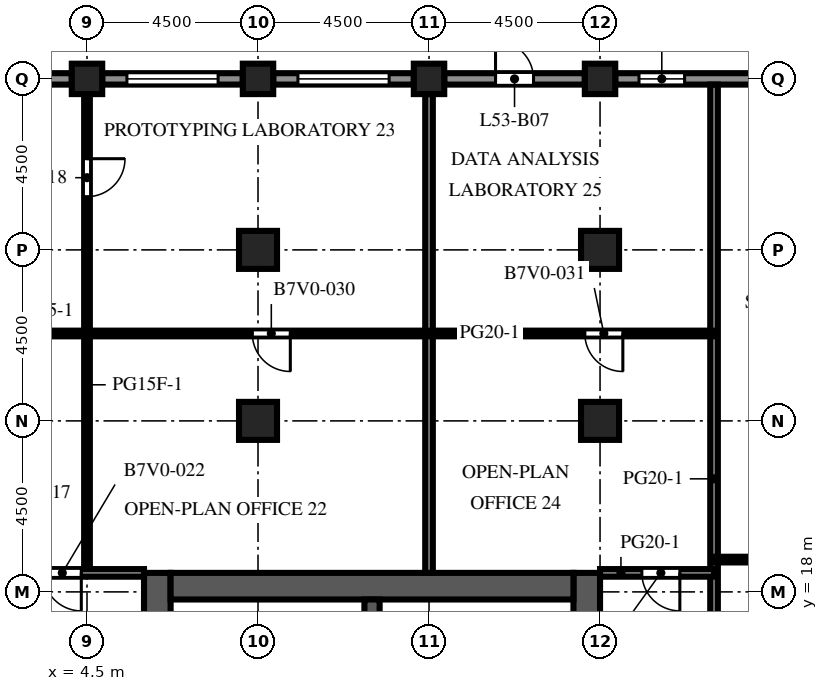
"""IFC4 building model, lengths in metres.
Left out: names, types, materials, properties, quantities, classifications, styles, units other than length and angle.
Written with IfcOpenShell. Run it as: python <this file> out.ifc"""

import sys

from ifc_helpers import new_model, si_unit, direction, frame, frame_2d, origin, origin_2d, place, context, subcontext, project, spatial, rectangle, extrude, element, fill, save


model = new_model("IFC4")
c1 = context("Model", 3, precision=1e-05, world=origin(), true_north=direction((0.0, 1.0)))
c2 = subcontext(c1, "Body", "Model", "MODEL_VIEW")
j1 = project(units=[si_unit("LENGTHUNIT", "METRE"), si_unit("PLANEANGLEUNIT", "RADIAN")], contexts=[c1])
p1 = place(None, origin())
s1 = spatial("IfcSite", under=j1, at=p1, CompositionType="ELEMENT")
p2 = place(p1, origin())
s2 = spatial("IfcBuilding", under=s1, at=p2, CompositionType="ELEMENT")
p3 = place(p2, frame((0.0, 0.0, 235.7)))
s3 = spatial("IfcBuildingStorey", under=s2, at=p3, CompositionType="ELEMENT", Elevation=235.7)
for number, where, z_axis, x_axis in (
    (1, (4.5, 31.5, 0.0), (0.0, 0.0, 1.0), (1.0, 0.0, 0.0)),
    (2, (9.0, 31.5, 0.0), (0.0, 0.0, 1.0), (1.0, 0.0, 0.0)),
    (3, (13.5, 31.5, 0.0), (0.0, 0.0, 1.0), (1.0, 0.0, 0.0)),
    (4, (18.0, 31.5, 0.0), (0.0, 0.0, 1.0), (1.0, 0.0, 0.0)),
):
    element("IfcColumn", number, at=place(p3, frame(where, z_axis=z_axis, x_axis=x_axis)), inside=s3, PredefinedType="COLUMN", context=c2, shape_type="SweptSolid", body=[
        extrude(rectangle(XDim=0.8, YDim=0.8, at=origin_2d()), origin(), (0.0, 0.0, 1.0), 4.1),
    ])
for number, where, z_axis, x_axis in (
    (5, (9.0, 22.5, 0.0), (0.0, 0.0, 1.0), (1.0, 0.0, 0.0)),
    (6, (9.0, 27.0, 0.0), (0.0, 0.0, 1.0), (1.0, 0.0, 0.0)),
    (7, (18.0, 22.5, 0.0), (0.0, 0.0, 1.0), (1.0, 0.0, 0.0)),
    (8, (18.0, 27.0, 0.0), (0.0, 0.0, 1.0), (1.0, 0.0, 0.0)),
):
    element("IfcColumn", number, at=place(p3, frame(where, z_axis=z_axis, x_axis=x_axis)), inside=s3, PredefinedType="COLUMN", context=c2, shape_type="SweptSolid", body=[
        extrude(rectangle(XDim=1.0, YDim=1.0, at=origin_2d()), origin(), (0.0, 0.0, 1.0), 4.1),
    ])
p4 = place(p3, frame((6.35, -9.0, 0.0), z_axis=(0.0, 0.0, 1.0), x_axis=(0.0, 1.0, 0.0)))
e9 = element("IfcWall", 9, at=p4, inside=s3, PredefinedType="SHEAR", context=c2, shape_type="SweptSolid", body=[
    extrude(rectangle(XDim=27.5, YDim=0.7, at=frame_2d((13.75, 0.0))), origin(), (0.0, 0.0, 1.0), 4.1),
])
p5 = place(p4, frame((12.55, 0.0, 0.0)))
e10 = element("IfcOpeningElement", 10, at=p5, cuts=e9, PredefinedType="OPENING", context=c2, shape_type="SweptSolid", body=[
    extrude(rectangle(XDim=2.4, YDim=2.4, at=frame_2d((1.2, 1.2))), frame((0.0, 0.36, 0.0), z_axis=(0.0, -1.0, 0.0), x_axis=(1.0, 0.0, 0.0)), (0.0, 0.0, 1.0), 0.72),
])
p6 = place(p4, frame((5.42, 0.0, 0.0)))
e11 = element("IfcOpeningElement", 11, at=p6, cuts=e9, PredefinedType="OPENING", context=c2, shape_type="SweptSolid", body=[
    extrude(rectangle(XDim=1.2, YDim=2.1, at=frame_2d((0.6, 1.05))), frame((0.0, 0.36, 0.0), z_axis=(0.0, -1.0, 0.0), x_axis=(1.0, 0.0, 0.0)), (0.0, 0.0, 1.0), 0.72),
])
p7 = place(p4, frame((19.46, 0.0, 0.0)))
e12 = element("IfcOpeningElement", 12, at=p7, cuts=e9, PredefinedType="OPENING", context=c2, shape_type="SweptSolid", body=[
    extrude(rectangle(XDim=1.0, YDim=2.1, at=frame_2d((0.5, 1.05))), frame((0.0, 0.36, 0.0), z_axis=(0.0, -1.0, 0.0), x_axis=(1.0, 0.0, 0.0)), (0.0, 0.0, 1.0), 0.72),
])
p8 = place(p4, frame((21.17, 0.0, 0.0)))
e13 = element("IfcOpeningElement", 13, at=p8, cuts=e9, PredefinedType="OPENING", context=c2, shape_type="SweptSolid", body=[
    extrude(rectangle(XDim=1.0, YDim=2.1, at=frame_2d((0.5, 1.05))), frame((0.0, 0.36, 0.0), z_axis=(0.0, -1.0, 0.0), x_axis=(1.0, 0.0, 0.0)), (0.0, 0.0, 1.0), 0.72),
])
p9 = place(p4, frame((23.26, 0.0, 0.0)))
e14 = element("IfcOpeningElement", 14, at=p9, cuts=e9, PredefinedType="OPENING", context=c2, shape_type="SweptSolid", body=[
    extrude(rectangle(XDim=1.0, YDim=2.1, at=frame_2d((0.5, 1.05))), frame((0.0, 0.36, 0.0), z_axis=(0.0, -1.0, 0.0), x_axis=(1.0, 0.0, 0.0)), (0.0, 0.0, 1.0), 0.72),
])
p10 = place(p4, frame((25.35, 0.0, 0.0)))
e15 = element("IfcOpeningElement", 15, at=p10, cuts=e9, PredefinedType="OPENING", context=c2, shape_type="SweptSolid", body=[
    extrude(rectangle(XDim=1.0, YDim=2.1, at=frame_2d((0.5, 1.05))), frame((0.0, 0.36, 0.0), z_axis=(0.0, -1.0, 0.0), x_axis=(1.0, 0.0, 0.0)), (0.0, 0.0, 1.0), 0.72),
])
p11 = place(p3, frame((17.65, -9.0, 0.0), z_axis=(0.0, 0.0, 1.0), x_axis=(0.0, 1.0, 0.0)))
e16 = element("IfcWall", 16, at=p11, inside=s3, PredefinedType="SHEAR", context=c2, shape_type="SweptSolid", body=[
    extrude(rectangle(XDim=27.5, YDim=0.7, at=frame_2d((13.75, 0.0))), origin(), (0.0, 0.0, 1.0), 4.1),
])
p12 = place(p11, frame((12.55, 0.0, 0.0)))
e17 = element("IfcOpeningElement", 17, at=p12, cuts=e16, PredefinedType="OPENING", context=c2, shape_type="SweptSolid", body=[
    extrude(rectangle(XDim=2.4, YDim=2.4, at=frame_2d((1.2, 1.2))), frame((0.0, 0.36, 0.0), z_axis=(0.0, -1.0, 0.0), x_axis=(1.0, 0.0, 0.0)), (0.0, 0.0, 1.0), 0.72),
])
p13 = place(p11, frame((6.825, 0.0, 0.0)))
e18 = element("IfcOpeningElement", 18, at=p13, cuts=e16, PredefinedType="OPENING", context=c2, shape_type="SweptSolid", body=[
    extrude(rectangle(XDim=1.2, YDim=2.1, at=frame_2d((0.6, 1.05))), frame((0.0, 0.36, 0.0), z_axis=(0.0, -1.0, 0.0), x_axis=(1.0, 0.0, 0.0)), (0.0, 0.0, 1.0), 0.72),
])
p14 = place(p11, frame((19.475, 0.0, 0.0)))
e19 = element("IfcOpeningElement", 19, at=p14, cuts=e16, PredefinedType="OPENING", context=c2, shape_type="SweptSolid", body=[
    extrude(rectangle(XDim=1.2, YDim=2.1, at=frame_2d((0.6, 1.05))), frame((0.0, 0.36, 0.0), z_axis=(0.0, -1.0, 0.0), x_axis=(1.0, 0.0, 0.0)), (0.0, 0.0, 1.0), 0.72),
])
p15 = place(p3, frame((6.7, 18.15, 0.0), z_axis=(0.0, 0.0, 1.0), x_axis=(1.0, 0.0, 0.0)))
e20 = element("IfcWall", 20, at=p15, inside=s3, PredefinedType="SHEAR", context=c2, shape_type="SweptSolid", body=[
    extrude(rectangle(XDim=10.6, YDim=0.7, at=frame_2d((5.3, 0.0))), origin(), (0.0, 0.0, 1.0), 4.1),
])
p16 = place(p3, frame((12.0, 10.2, 0.0), z_axis=(0.0, 0.0, 1.0), x_axis=(0.0, 1.0, 0.0)))
e21 = element("IfcWall", 21, at=p16, inside=s3, PredefinedType="SHEAR", context=c2, shape_type="SweptSolid", body=[
    extrude(rectangle(XDim=7.6, YDim=0.4, at=frame_2d((3.8, 0.0))), origin(), (0.0, 0.0, 1.0), 4.1),
])
p17 = place(p3, frame((18.4, 31.5, 0.0), z_axis=(0.0, 0.0, 1.0), x_axis=(1.0, 0.0, 0.0)))
e22 = element("IfcWall", 22, at=p17, inside=s3, PredefinedType="SOLIDWALL", context=c2, shape_type="SweptSolid", body=[
    extrude(rectangle(XDim=3.7, YDim=0.3, at=frame_2d((1.85, 0.0))), origin(), (0.0, 0.0, 1.0), 2.85),
])
p18 = place(p17, frame((0.625, 0.0, 0.8)))
e23 = element("IfcOpeningElement", 23, at=p18, cuts=e22, PredefinedType="OPENING", context=c2, shape_type="SweptSolid", body=[
    extrude(rectangle(XDim=1.2, YDim=1.7, at=frame_2d((0.6, 0.85))), frame((0.0, 0.16, 0.0), z_axis=(0.0, -1.0, 0.0), x_axis=(1.0, 0.0, 0.0)), (0.0, 0.0, 1.0), 0.32),
])
p19 = place(p3, frame((13.9, 31.5, 0.0), z_axis=(0.0, 0.0, 1.0), x_axis=(1.0, 0.0, 0.0)))
e24 = element("IfcWall", 24, at=p19, inside=s3, PredefinedType="SOLIDWALL", context=c2, shape_type="SweptSolid", body=[
    extrude(rectangle(XDim=3.7, YDim=0.3, at=frame_2d((1.85, 0.0))), origin(), (0.0, 0.0, 1.0), 2.85),
])
p20 = place(p19, frame((1.35, 0.0, 0.0)))
e25 = element("IfcOpeningElement", 25, at=p20, cuts=e24, PredefinedType="OPENING", context=c2, shape_type="SweptSolid", body=[
    extrude(rectangle(XDim=1.0, YDim=2.2, at=frame_2d((0.5, 1.1))), frame((0.0, 0.16, 0.0), z_axis=(0.0, -1.0, 0.0), x_axis=(1.0, 0.0, 0.0)), (0.0, 0.0, 1.0), 0.32),
])
p21 = place(p3, frame((9.4, 31.5, 0.0), z_axis=(0.0, 0.0, 1.0), x_axis=(1.0, 0.0, 0.0)))
e26 = element("IfcWall", 26, at=p21, inside=s3, PredefinedType="SOLIDWALL", context=c2, shape_type="SweptSolid", body=[
    extrude(rectangle(XDim=3.7, YDim=0.3, at=frame_2d((1.85, 0.0))), origin(), (0.0, 0.0, 1.0), 2.85),
])
p22 = place(p21, frame((0.65, 0.0, 0.8)))
e27 = element("IfcOpeningElement", 27, at=p22, cuts=e26, PredefinedType="OPENING", context=c2, shape_type="SweptSolid", body=[
    extrude(rectangle(XDim=2.4, YDim=1.7, at=frame_2d((1.2, 0.85))), frame((0.0, 0.16, 0.0), z_axis=(0.0, -1.0, 0.0), x_axis=(1.0, 0.0, 0.0)), (0.0, 0.0, 1.0), 0.32),
])
p23 = place(p3, frame((4.9, 31.5, 0.0), z_axis=(0.0, 0.0, 1.0), x_axis=(1.0, 0.0, 0.0)))
e28 = element("IfcWall", 28, at=p23, inside=s3, PredefinedType="SOLIDWALL", context=c2, shape_type="SweptSolid", body=[
    extrude(rectangle(XDim=3.7, YDim=0.3, at=frame_2d((1.85, 0.0))), origin(), (0.0, 0.0, 1.0), 2.85),
])
p24 = place(p23, frame((0.65, 0.0, 0.8)))
e29 = element("IfcOpeningElement", 29, at=p24, cuts=e28, PredefinedType="OPENING", context=c2, shape_type="SweptSolid", body=[
    extrude(rectangle(XDim=2.4, YDim=1.7, at=frame_2d((1.2, 0.85))), frame((0.0, 0.16, 0.0), z_axis=(0.0, -1.0, 0.0), x_axis=(1.0, 0.0, 0.0)), (0.0, 0.0, 1.0), 0.32),
])
p25 = place(p3, frame((0.4, 31.5, 0.0), z_axis=(0.0, 0.0, 1.0), x_axis=(1.0, 0.0, 0.0)))
e30 = element("IfcWall", 30, at=p25, inside=s3, PredefinedType="SOLIDWALL", context=c2, shape_type="SweptSolid", body=[
    extrude(rectangle(XDim=3.7, YDim=0.3, at=frame_2d((1.85, 0.0))), origin(), (0.0, 0.0, 1.0), 2.85),
])
p26 = place(p25, frame((0.65, 0.0, 0.8)))
e31 = element("IfcOpeningElement", 31, at=p26, cuts=e30, PredefinedType="OPENING", context=c2, shape_type="SweptSolid", body=[
    extrude(rectangle(XDim=2.4, YDim=1.7, at=frame_2d((1.2, 0.85))), frame((0.0, 0.16, 0.0), z_axis=(0.0, -1.0, 0.0), x_axis=(1.0, 0.0, 0.0)), (0.0, 0.0, 1.0), 0.32),
])
p27 = place(p3, frame((4.5, 31.1, 0.0), z_axis=(0.0, 0.0, 1.0), x_axis=(0.0, -1.0, 0.0)))
e32 = element("IfcWall", 32, at=p27, inside=s3, PredefinedType="PARTITIONING", context=c2, shape_type="SweptSolid", body=[
    extrude(rectangle(XDim=12.6, YDim=0.15, at=frame_2d((6.3, 0.0))), origin(), (0.0, 0.0, 1.0), 3.65),
])
p28 = place(p27, frame((1.7, 0.0, 0.0)))
e33 = element("IfcOpeningElement", 33, at=p28, cuts=e32, PredefinedType="OPENING", context=c2, shape_type="SweptSolid", body=[
    extrude(rectangle(XDim=1.0, YDim=2.1, at=frame_2d((0.5, 1.05))), frame((0.0, 0.085, 0.0), z_axis=(0.0, -1.0, 0.0), x_axis=(1.0, 0.0, 0.0)), (0.0, 0.0, 1.0), 0.17),
])
p29 = place(p3, frame((13.5, 18.5, 0.0), z_axis=(0.0, 0.0, 1.0), x_axis=(0.0, 1.0, 0.0)))
e34 = element("IfcWall", 34, at=p29, inside=s3, PredefinedType="PARTITIONING", context=c2, shape_type="SweptSolid", body=[
    extrude(rectangle(XDim=12.6, YDim=0.2, at=frame_2d((6.3, 0.0))), origin(), (0.0, 0.0, 1.0), 3.65),
])
p30 = place(p3, frame((21.0, 31.35, 0.0), z_axis=(0.0, 0.0, 1.0), x_axis=(0.0, -1.0, 0.0)))
e35 = element("IfcWall", 35, at=p30, inside=s3, PredefinedType="PARTITIONING", context=c2, shape_type="SweptSolid", body=[
    extrude(rectangle(XDim=25.1, YDim=0.2, at=frame_2d((12.55, 0.0))), origin(), (0.0, 0.0, 1.0), 3.65),
])
p31 = place(p30, frame((20.75, 0.0, 0.0)))
e36 = element("IfcOpeningElement", 36, at=p31, cuts=e35, PredefinedType="OPENING", context=c2, shape_type="SweptSolid", body=[
    extrude(rectangle(XDim=1.0, YDim=2.1, at=frame_2d((0.5, 1.05))), frame((0.0, 0.11, 0.0), z_axis=(0.0, -1.0, 0.0), x_axis=(1.0, 0.0, 0.0)), (0.0, 0.0, 1.0), 0.22),
])
p32 = place(p3, frame((1.5, 18.5, 0.0), z_axis=(0.0, 0.0, 1.0), x_axis=(1.0, 0.0, 0.0)))
e37 = element("IfcWall", 37, at=p32, inside=s3, PredefinedType="PARTITIONING", context=c2, shape_type="SweptSolid", body=[
    extrude(rectangle(XDim=4.5, YDim=0.2, at=frame_2d((2.25, 0.0))), origin(), (0.0, 0.0, 1.0), 3.65),
])
p33 = place(p32, frame((1.85, 0.0, 0.0)))
e38 = element("IfcOpeningElement", 38, at=p33, cuts=e37, PredefinedType="OPENING", context=c2, shape_type="SweptSolid", body=[
    extrude(rectangle(XDim=1.0, YDim=2.1, at=frame_2d((0.5, 1.05))), frame((0.0, 0.11, 0.0), z_axis=(0.0, -1.0, 0.0), x_axis=(1.0, 0.0, 0.0)), (0.0, 0.0, 1.0), 0.22),
])
p34 = place(p3, frame((18.0, 18.5, 0.0), z_axis=(0.0, 0.0, 1.0), x_axis=(1.0, 0.0, 0.0)))
e39 = element("IfcWall", 39, at=p34, inside=s3, PredefinedType="PARTITIONING", context=c2, shape_type="SweptSolid", body=[
    extrude(rectangle(XDim=3.0, YDim=0.2, at=frame_2d((1.5, 0.0))), origin(), (0.0, 0.0, 1.0), 3.65),
])
p35 = place(p34, frame((1.1, 0.0, 0.0)))
e40 = element("IfcOpeningElement", 40, at=p35, cuts=e39, PredefinedType="OPENING", context=c2, shape_type="SweptSolid", body=[
    extrude(rectangle(XDim=1.0, YDim=2.1, at=frame_2d((0.5, 1.05))), frame((0.0, 0.11, 0.0), z_axis=(0.0, -1.0, 0.0), x_axis=(1.0, 0.0, 0.0)), (0.0, 0.0, 1.0), 0.22),
])
p36 = place(p3, frame((21.0, 18.85, 0.0), z_axis=(0.0, 0.0, 1.0), x_axis=(1.0, 0.0, 0.0)))
e41 = element("IfcWall", 41, at=p36, inside=s3, PredefinedType="PARTITIONING", context=c2, shape_type="SweptSolid", body=[
    extrude(rectangle(XDim=5.85, YDim=0.15, at=frame_2d((2.925, 0.0))), origin(), (0.0, 0.0, 1.0), 3.65),
])
p37 = place(p36, frame((3.35, 0.0, 0.0)))
e42 = element("IfcOpeningElement", 42, at=p37, cuts=e41, PredefinedType="OPENING", context=c2, shape_type="SweptSolid", body=[
    extrude(rectangle(XDim=1.0, YDim=2.1, at=frame_2d((0.5, 1.05))), frame((0.0, 0.085, 0.0), z_axis=(0.0, -1.0, 0.0), x_axis=(1.0, 0.0, 0.0)), (0.0, 0.0, 1.0), 0.17),
])
p38 = place(p3, frame((-13.5, 24.8, 0.0), z_axis=(0.0, 0.0, 1.0), x_axis=(1.0, 0.0, 0.0)))
e43 = element("IfcWall", 43, at=p38, inside=s3, PredefinedType="PARTITIONING", context=c2, shape_type="SweptSolid", body=[
    extrude(rectangle(XDim=34.5, YDim=0.15, at=frame_2d((17.25, 0.0))), origin(), (0.0, 0.0, 1.0), 3.65),
])
p39 = place(p38, frame((1.6, 0.0, 0.0)))
e44 = element("IfcOpeningElement", 44, at=p39, cuts=e43, PredefinedType="OPENING", context=c2, shape_type="SweptSolid", body=[
    extrude(rectangle(XDim=1.0, YDim=2.1, at=frame_2d((0.5, 1.05))), frame((0.0, 0.085, 0.0), z_axis=(0.0, -1.0, 0.0), x_axis=(1.0, 0.0, 0.0)), (0.0, 0.0, 1.0), 0.17),
])
p40 = place(p38, frame((10.35, 0.0, 0.0)))
e45 = element("IfcOpeningElement", 45, at=p40, cuts=e43, PredefinedType="OPENING", context=c2, shape_type="SweptSolid", body=[
    extrude(rectangle(XDim=1.0, YDim=2.1, at=frame_2d((0.5, 1.05))), frame((0.0, 0.085, 0.0), z_axis=(0.0, -1.0, 0.0), x_axis=(1.0, 0.0, 0.0)), (0.0, 0.0, 1.0), 0.17),
])
p41 = place(p38, frame((22.35, 0.0, 0.0)))
e46 = element("IfcOpeningElement", 46, at=p41, cuts=e43, PredefinedType="OPENING", context=c2, shape_type="SweptSolid", body=[
    extrude(rectangle(XDim=1.0, YDim=2.1, at=frame_2d((0.5, 1.05))), frame((0.0, 0.085, 0.0), z_axis=(0.0, -1.0, 0.0), x_axis=(1.0, 0.0, 0.0)), (0.0, 0.0, 1.0), 0.17),
])
p42 = place(p38, frame((31.1, 0.0, 0.0)))
e47 = element("IfcOpeningElement", 47, at=p42, cuts=e43, PredefinedType="OPENING", context=c2, shape_type="SweptSolid", body=[
    extrude(rectangle(XDim=1.0, YDim=2.1, at=frame_2d((0.5, 1.05))), frame((0.0, 0.085, 0.0), z_axis=(0.0, -1.0, 0.0), x_axis=(1.0, 0.0, 0.0)), (0.0, 0.0, 1.0), 0.17),
])
p43 = place(p18, origin())
e48 = element("IfcWindow", 48, at=p43, inside=s3, PartitioningType="SINGLE_PANEL", PredefinedType="WINDOW", context=c2, shape_type="SweptSolid", body=[
    extrude(rectangle(XDim=1.2, YDim=1.7, at=frame_2d((0.6, 0.85))), frame((0.0, 0.03, 0.0), z_axis=(0.0, -1.0, 0.0), x_axis=(1.0, 0.0, 0.0)), (0.0, 0.0, 1.0), 0.06),
])
fill(e23, e48)
p44 = place(p20, origin())
e49 = element("IfcDoor", 49, at=p44, inside=s3, OperationType="SINGLE_SWING_LEFT", PredefinedType="DOOR", context=c2, shape_type="SweptSolid", body=[
    extrude(rectangle(XDim=1.0, YDim=2.2, at=frame_2d((0.5, 1.1))), frame((0.0, 0.025, 0.0), z_axis=(0.0, -1.0, 0.0), x_axis=(1.0, 0.0, 0.0)), (0.0, 0.0, 1.0), 0.05),
])
fill(e25, e49)
p45 = place(p22, origin())
e50 = element("IfcWindow", 50, at=p45, inside=s3, PartitioningType="SINGLE_PANEL", PredefinedType="WINDOW", context=c2, shape_type="SweptSolid", body=[
    extrude(rectangle(XDim=2.4, YDim=1.7, at=frame_2d((1.2, 0.85))), frame((0.0, 0.03, 0.0), z_axis=(0.0, -1.0, 0.0), x_axis=(1.0, 0.0, 0.0)), (0.0, 0.0, 1.0), 0.06),
])
fill(e27, e50)
p46 = place(p24, origin())
e51 = element("IfcWindow", 51, at=p46, inside=s3, PartitioningType="SINGLE_PANEL", PredefinedType="WINDOW", context=c2, shape_type="SweptSolid", body=[
    extrude(rectangle(XDim=2.4, YDim=1.7, at=frame_2d((1.2, 0.85))), frame((0.0, 0.03, 0.0), z_axis=(0.0, -1.0, 0.0), x_axis=(1.0, 0.0, 0.0)), (0.0, 0.0, 1.0), 0.06),
])
fill(e29, e51)
p47 = place(p28, origin())
e52 = element("IfcDoor", 52, at=p47, inside=s3, OperationType="SINGLE_SWING_LEFT", PredefinedType="DOOR", context=c2, shape_type="SweptSolid", body=[
    extrude(rectangle(XDim=1.0, YDim=2.1, at=frame_2d((0.5, 1.05))), frame((0.0, 0.025, 0.0), z_axis=(0.0, -1.0, 0.0), x_axis=(1.0, 0.0, 0.0)), (0.0, 0.0, 1.0), 0.05),
])
fill(e33, e52)
p48 = place(p33, origin())
e53 = element("IfcDoor", 53, at=p48, inside=s3, OperationType="SINGLE_SWING_RIGHT", PredefinedType="DOOR", context=c2, shape_type="SweptSolid", body=[
    extrude(rectangle(XDim=1.0, YDim=2.1, at=frame_2d((0.5, 1.05))), frame((0.0, 0.025, 0.0), z_axis=(0.0, -1.0, 0.0), x_axis=(1.0, 0.0, 0.0)), (0.0, 0.0, 1.0), 0.05),
])
fill(e38, e53)
p49 = place(p35, origin())
e54 = element("IfcDoor", 54, at=p49, inside=s3, OperationType="SINGLE_SWING_RIGHT", PredefinedType="DOOR", context=c2, shape_type="SweptSolid", body=[
    extrude(rectangle(XDim=1.0, YDim=2.1, at=frame_2d((0.5, 1.05))), frame((0.0, 0.025, 0.0), z_axis=(0.0, -1.0, 0.0), x_axis=(1.0, 0.0, 0.0)), (0.0, 0.0, 1.0), 0.05),
])
fill(e40, e54)
p50 = place(p41, origin())
e55 = element("IfcDoor", 55, at=p50, inside=s3, OperationType="SINGLE_SWING_RIGHT", PredefinedType="DOOR", context=c2, shape_type="SweptSolid", body=[
    extrude(rectangle(XDim=1.0, YDim=2.1, at=frame_2d((0.5, 1.05))), frame((0.0, 0.025, 0.0), z_axis=(0.0, -1.0, 0.0), x_axis=(1.0, 0.0, 0.0)), (0.0, 0.0, 1.0), 0.05),
])
fill(e46, e55)
p51 = place(p42, origin())
e56 = element("IfcDoor", 56, at=p51, inside=s3, OperationType="SINGLE_SWING_RIGHT", PredefinedType="DOOR", context=c2, shape_type="SweptSolid", body=[
    extrude(rectangle(XDim=1.0, YDim=2.1, at=frame_2d((0.5, 1.05))), frame((0.0, 0.025, 0.0), z_axis=(0.0, -1.0, 0.0), x_axis=(1.0, 0.0, 0.0)), (0.0, 0.0, 1.0), 0.05),
])
fill(e47, e56)
save(model, sys.argv[1])
